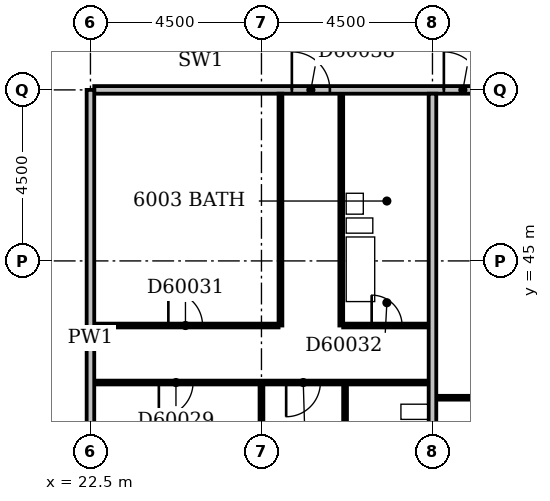
"""IFC4 building model, lengths in metres.
Left out: names, types, materials, properties, quantities, classifications, styles, units other than length and angle.
Written with IfcOpenShell. Run it as: python <this file> out.ifc"""

import sys

from ifc_helpers import new_model, si_unit, direction, frame, frame_2d, origin, place, context, subcontext, project, spatial, rectangle, extrude, element, fill, save


model = new_model("IFC4")
c1 = context("Model", 3, precision=1e-05, world=origin(), true_north=direction((0.0, 1.0)))
c2 = subcontext(c1, "Body", "Model", "MODEL_VIEW")
j1 = project(units=[si_unit("LENGTHUNIT", "METRE"), si_unit("PLANEANGLEUNIT", "RADIAN")], contexts=[c1])
p1 = place(None, origin())
s1 = spatial("IfcSite", under=j1, at=p1, CompositionType="ELEMENT")
p2 = place(p1, origin())
s2 = spatial("IfcBuilding", under=s1, at=p2, CompositionType="ELEMENT")
p3 = place(p2, frame((0.0, 0.0, 233.0)))
s3 = spatial("IfcBuildingStorey", under=s2, at=p3, CompositionType="ELEMENT", Elevation=233.0)
p4 = place(p3, frame((22.5, 36.45, 0.0), z_axis=(0.0, 0.0, 1.0), x_axis=(0.0, 1.0, 0.0)))
e1 = element("IfcWall", 1, at=p4, inside=s3, PredefinedType="PARTITIONING", context=c2, shape_type="SweptSolid", body=[
    extrude(rectangle(XDim=13.05, YDim=0.2, at=frame_2d((6.525, 0.0))), origin(), (0.0, 0.0, 1.0), 3.3),
])
p5 = place(p3, frame((27.0, 36.45, 0.0), z_axis=(0.0, 0.0, 1.0), x_axis=(0.0, 1.0, 0.0)))
e2 = element("IfcWall", 2, at=p5, inside=s3, PredefinedType="PARTITIONING", context=c2, shape_type="SweptSolid", body=[
    extrude(rectangle(XDim=5.3, YDim=0.1, at=frame_2d((2.65, 0.0))), origin(), (0.0, 0.0, 1.0), 2.4),
])
p6 = place(p3, frame((31.5, 36.45, 0.0), z_axis=(0.0, 0.0, 1.0), x_axis=(0.0, 1.0, 0.0)))
e3 = element("IfcWall", 3, at=p6, inside=s3, PredefinedType="PARTITIONING", context=c2, shape_type="SweptSolid", body=[
    extrude(rectangle(XDim=12.95, YDim=0.2, at=frame_2d((6.475, 0.0))), origin(), (0.0, 0.0, 1.0), 3.3),
])
p7 = place(p3, frame((29.2, 38.9, 0.0), z_axis=(0.0, 0.0, 1.0), x_axis=(0.0, 1.0, 0.0)))
e4 = element("IfcWall", 4, at=p7, inside=s3, PredefinedType="PLUMBINGWALL", context=c2, shape_type="SweptSolid", body=[
    extrude(rectangle(XDim=2.85, YDim=0.1, at=frame_2d((1.425, 0.0))), origin(), (0.0, 0.0, 1.0), 3.3),
])
p8 = place(p7, frame((1.05, 0.0, 0.0)))
e5 = element("IfcOpeningElement", 5, at=p8, cuts=e4, PredefinedType="OPENING", context=c2, shape_type="SweptSolid", body=[
    extrude(rectangle(XDim=0.8, YDim=2.1, at=frame_2d((0.4, 1.05))), frame((0.0, 0.062, 0.0), z_axis=(0.0, -1.0, 0.0), x_axis=(1.0, 0.0, 0.0)), (0.0, 0.0, 1.0), 0.124),
])
p9 = place(p3, frame((31.6, 41.4, 0.0), z_axis=(0.0, 0.0, 1.0), x_axis=(1.0, 0.0, 0.0)))
e6 = element("IfcWall", 6, at=p9, inside=s3, PredefinedType="PARTITIONING", context=c2, shape_type="SweptSolid", body=[
    extrude(rectangle(XDim=14.0, YDim=0.1, at=frame_2d((7.0, 0.0))), origin(), (0.0, 0.0, 1.0), 3.3),
])
p10 = place(p9, frame((1.7, 0.0, 0.0)))
e7 = element("IfcOpeningElement", 7, at=p10, cuts=e6, PredefinedType="OPENING", context=c2, shape_type="SweptSolid", body=[
    extrude(rectangle(XDim=0.9, YDim=2.1, at=frame_2d((0.45, 1.05))), frame((0.0, 0.062, 0.0), z_axis=(0.0, -1.0, 0.0), x_axis=(1.0, 0.0, 0.0)), (0.0, 0.0, 1.0), 0.124),
])
p11 = place(p9, frame((6.2, 0.0, 0.0)))
e8 = element("IfcOpeningElement", 8, at=p11, cuts=e6, PredefinedType="OPENING", context=c2, shape_type="SweptSolid", body=[
    extrude(rectangle(XDim=0.9, YDim=2.1, at=frame_2d((0.45, 1.05))), frame((0.0, 0.062, 0.0), z_axis=(0.0, -1.0, 0.0), x_axis=(1.0, 0.0, 0.0)), (0.0, 0.0, 1.0), 0.124),
])
p12 = place(p9, frame((10.7, 0.0, 0.0)))
e9 = element("IfcOpeningElement", 9, at=p12, cuts=e6, PredefinedType="OPENING", context=c2, shape_type="SweptSolid", body=[
    extrude(rectangle(XDim=0.9, YDim=2.1, at=frame_2d((0.45, 1.05))), frame((0.0, 0.062, 0.0), z_axis=(0.0, -1.0, 0.0), x_axis=(1.0, 0.0, 0.0)), (0.0, 0.0, 1.0), 0.124),
])
p13 = place(p3, frame((22.6, 41.8, 0.0), z_axis=(0.0, 0.0, 1.0), x_axis=(1.0, 0.0, 0.0)))
e10 = element("IfcWall", 10, at=p13, inside=s3, PredefinedType="PARTITIONING", context=c2, shape_type="SweptSolid", body=[
    extrude(rectangle(XDim=8.8, YDim=0.1, at=frame_2d((4.4, 0.0))), origin(), (0.0, 0.0, 1.0), 3.3),
])
p14 = place(p13, frame((1.7, 0.0, 0.0)))
e11 = element("IfcOpeningElement", 11, at=p14, cuts=e10, PredefinedType="OPENING", context=c2, shape_type="SweptSolid", body=[
    extrude(rectangle(XDim=0.9, YDim=2.1, at=frame_2d((0.45, 1.05))), frame((0.0, 0.062, 0.0), z_axis=(0.0, -1.0, 0.0), x_axis=(1.0, 0.0, 0.0)), (0.0, 0.0, 1.0), 0.124),
])
p15 = place(p13, frame((5.05, 0.0, 0.0)))
e12 = element("IfcOpeningElement", 12, at=p15, cuts=e10, PredefinedType="OPENING", context=c2, shape_type="SweptSolid", body=[
    extrude(rectangle(XDim=0.9, YDim=2.1, at=frame_2d((0.45, 1.05))), frame((0.0, 0.062, 0.0), z_axis=(0.0, -1.0, 0.0), x_axis=(1.0, 0.0, 0.0)), (0.0, 0.0, 1.0), 0.124),
])
p16 = place(p3, frame((22.6, 43.3, 0.0), z_axis=(0.0, 0.0, 1.0), x_axis=(1.0, 0.0, 0.0)))
e13 = element("IfcWall", 13, at=p16, inside=s3, PredefinedType="PARTITIONING", context=c2, shape_type="SweptSolid", body=[
    extrude(rectangle(XDim=4.85, YDim=0.1, at=frame_2d((2.425, 0.0))), origin(), (0.0, 0.0, 1.0), 3.3),
])
p17 = place(p16, frame((1.95, 0.0, 0.0)))
e14 = element("IfcOpeningElement", 14, at=p17, cuts=e13, PredefinedType="OPENING", context=c2, shape_type="SweptSolid", body=[
    extrude(rectangle(XDim=0.9, YDim=2.1, at=frame_2d((0.45, 1.05))), frame((0.0, 0.062, 0.0), z_axis=(0.0, -1.0, 0.0), x_axis=(1.0, 0.0, 0.0)), (0.0, 0.0, 1.0), 0.124),
])
p18 = place(p3, frame((27.5, 43.3, 0.0), z_axis=(0.0, 0.0, 1.0), x_axis=(0.0, 1.0, 0.0)))
e15 = element("IfcWall", 15, at=p18, inside=s3, PredefinedType="PARTITIONING", context=c2, shape_type="SweptSolid", body=[
    extrude(rectangle(XDim=6.1, YDim=0.1, at=frame_2d((3.05, 0.0))), origin(), (0.0, 0.0, 1.0), 2.4),
])
p19 = place(p3, frame((29.1, 43.3, 0.0), z_axis=(0.0, 0.0, 1.0), x_axis=(0.0, 1.0, 0.0)))
e16 = element("IfcWall", 16, at=p19, inside=s3, PredefinedType="PLUMBINGWALL", context=c2, shape_type="SweptSolid", body=[
    extrude(rectangle(XDim=6.1, YDim=0.1, at=frame_2d((3.05, 0.0))), origin(), (0.0, 0.0, 1.0), 3.3),
])
p20 = place(p3, frame((29.15, 43.3, 0.0), z_axis=(0.0, 0.0, 1.0), x_axis=(1.0, 0.0, 0.0)))
e17 = element("IfcWall", 17, at=p20, inside=s3, PredefinedType="PARTITIONING", context=c2, shape_type="SweptSolid", body=[
    extrude(rectangle(XDim=2.25, YDim=0.1, at=frame_2d((1.125, 0.0))), origin(), (0.0, 0.0, 1.0), 3.3),
])
p21 = place(p20, frame((0.75, 0.0, 0.0)))
e18 = element("IfcOpeningElement", 18, at=p21, cuts=e17, PredefinedType="OPENING", context=c2, shape_type="SweptSolid", body=[
    extrude(rectangle(XDim=0.8, YDim=2.1, at=frame_2d((0.4, 1.05))), frame((0.0, 0.062, 0.0), z_axis=(0.0, -1.0, 0.0), x_axis=(1.0, 0.0, 0.0)), (0.0, 0.0, 1.0), 0.124),
])
p22 = place(p3, frame((22.6, 49.5, 0.0), z_axis=(0.0, 0.0, 1.0), x_axis=(1.0, 0.0, 0.0)))
e19 = element("IfcWall", 19, at=p22, inside=s3, PredefinedType="PARTITIONING", context=c2, shape_type="SweptSolid", body=[
    extrude(rectangle(XDim=21.95, YDim=0.2, at=frame_2d((10.975, 0.0))), origin(), (0.0, 0.0, 1.0), 3.3),
])
p23 = place(p22, frame((5.2, 0.0, 0.0)))
e20 = element("IfcOpeningElement", 20, at=p23, cuts=e19, PredefinedType="OPENING", context=c2, shape_type="SweptSolid", body=[
    extrude(rectangle(XDim=1.0, YDim=2.1, at=frame_2d((0.5, 1.05))), frame((0.0, 0.112, 0.0), z_axis=(0.0, -1.0, 0.0), x_axis=(1.0, 0.0, 0.0)), (0.0, 0.0, 1.0), 0.224),
])
p24 = place(p22, frame((9.2, 0.0, 0.0)))
e21 = element("IfcOpeningElement", 21, at=p24, cuts=e19, PredefinedType="OPENING", context=c2, shape_type="SweptSolid", body=[
    extrude(rectangle(XDim=1.0, YDim=2.1, at=frame_2d((0.5, 1.05))), frame((0.0, 0.112, 0.0), z_axis=(0.0, -1.0, 0.0), x_axis=(1.0, 0.0, 0.0)), (0.0, 0.0, 1.0), 0.224),
])
p25 = place(p14, frame((0.9, 0.0, 0.0), z_axis=(0.0, 0.0, 1.0), x_axis=(-1.0, 0.0, 0.0)))
e22 = element("IfcDoor", 22, at=p25, inside=s3, OperationType="SINGLE_SWING_RIGHT", PredefinedType="DOOR", context=c2, shape_type="SweptSolid", body=[
    extrude(rectangle(XDim=0.9, YDim=2.1, at=frame_2d((0.45, 1.05))), frame((0.0, 0.025, 0.0), z_axis=(0.0, -1.0, 0.0), x_axis=(1.0, 0.0, 0.0)), (0.0, 0.0, 1.0), 0.05),
])
fill(e11, e22)
p26 = place(p15, frame((0.9, 0.0, 0.0), z_axis=(0.0, 0.0, 1.0), x_axis=(-1.0, 0.0, 0.0)))
e23 = element("IfcDoor", 23, at=p26, inside=s3, OperationType="SINGLE_SWING_RIGHT", PredefinedType="DOOR", context=c2, shape_type="SweptSolid", body=[
    extrude(rectangle(XDim=0.9, YDim=2.1, at=frame_2d((0.45, 1.05))), frame((0.0, 0.025, 0.0), z_axis=(0.0, -1.0, 0.0), x_axis=(1.0, 0.0, 0.0)), (0.0, 0.0, 1.0), 0.05),
])
fill(e12, e23)
p27 = place(p17, origin())
e24 = element("IfcDoor", 24, at=p27, inside=s3, OperationType="SINGLE_SWING_LEFT", PredefinedType="DOOR", context=c2, shape_type="SweptSolid", body=[
    extrude(rectangle(XDim=0.9, YDim=2.1, at=frame_2d((0.45, 1.05))), frame((0.0, 0.025, 0.0), z_axis=(0.0, -1.0, 0.0), x_axis=(1.0, 0.0, 0.0)), (0.0, 0.0, 1.0), 0.05),
])
fill(e14, e24)
p28 = place(p21, origin())
e25 = element("IfcDoor", 25, at=p28, inside=s3, OperationType="SINGLE_SWING_LEFT", PredefinedType="DOOR", context=c2, shape_type="SweptSolid", body=[
    extrude(rectangle(XDim=0.8, YDim=2.1, at=frame_2d((0.4, 1.05))), frame((0.0, 0.025, 0.0), z_axis=(0.0, -1.0, 0.0), x_axis=(1.0, 0.0, 0.0)), (0.0, 0.0, 1.0), 0.05),
])
fill(e18, e25)
p29 = place(p23, origin())
e26 = element("IfcDoor", 26, at=p29, inside=s3, OperationType="SINGLE_SWING_LEFT", PredefinedType="DOOR", context=c2, shape_type="SweptSolid", body=[
    extrude(rectangle(XDim=1.0, YDim=2.1, at=frame_2d((0.5, 1.05))), frame((0.0, 0.025, 0.0), z_axis=(0.0, -1.0, 0.0), x_axis=(1.0, 0.0, 0.0)), (0.0, 0.0, 1.0), 0.05),
])
fill(e20, e26)
p30 = place(p24, origin())
e27 = element("IfcDoor", 27, at=p30, inside=s3, OperationType="SINGLE_SWING_LEFT", PredefinedType="DOOR", context=c2, shape_type="SweptSolid", body=[
    extrude(rectangle(XDim=1.0, YDim=2.1, at=frame_2d((0.5, 1.05))), frame((0.0, 0.025, 0.0), z_axis=(0.0, -1.0, 0.0), x_axis=(1.0, 0.0, 0.0)), (0.0, 0.0, 1.0), 0.05),
])
fill(e21, e27)
save(model, sys.argv[1])
